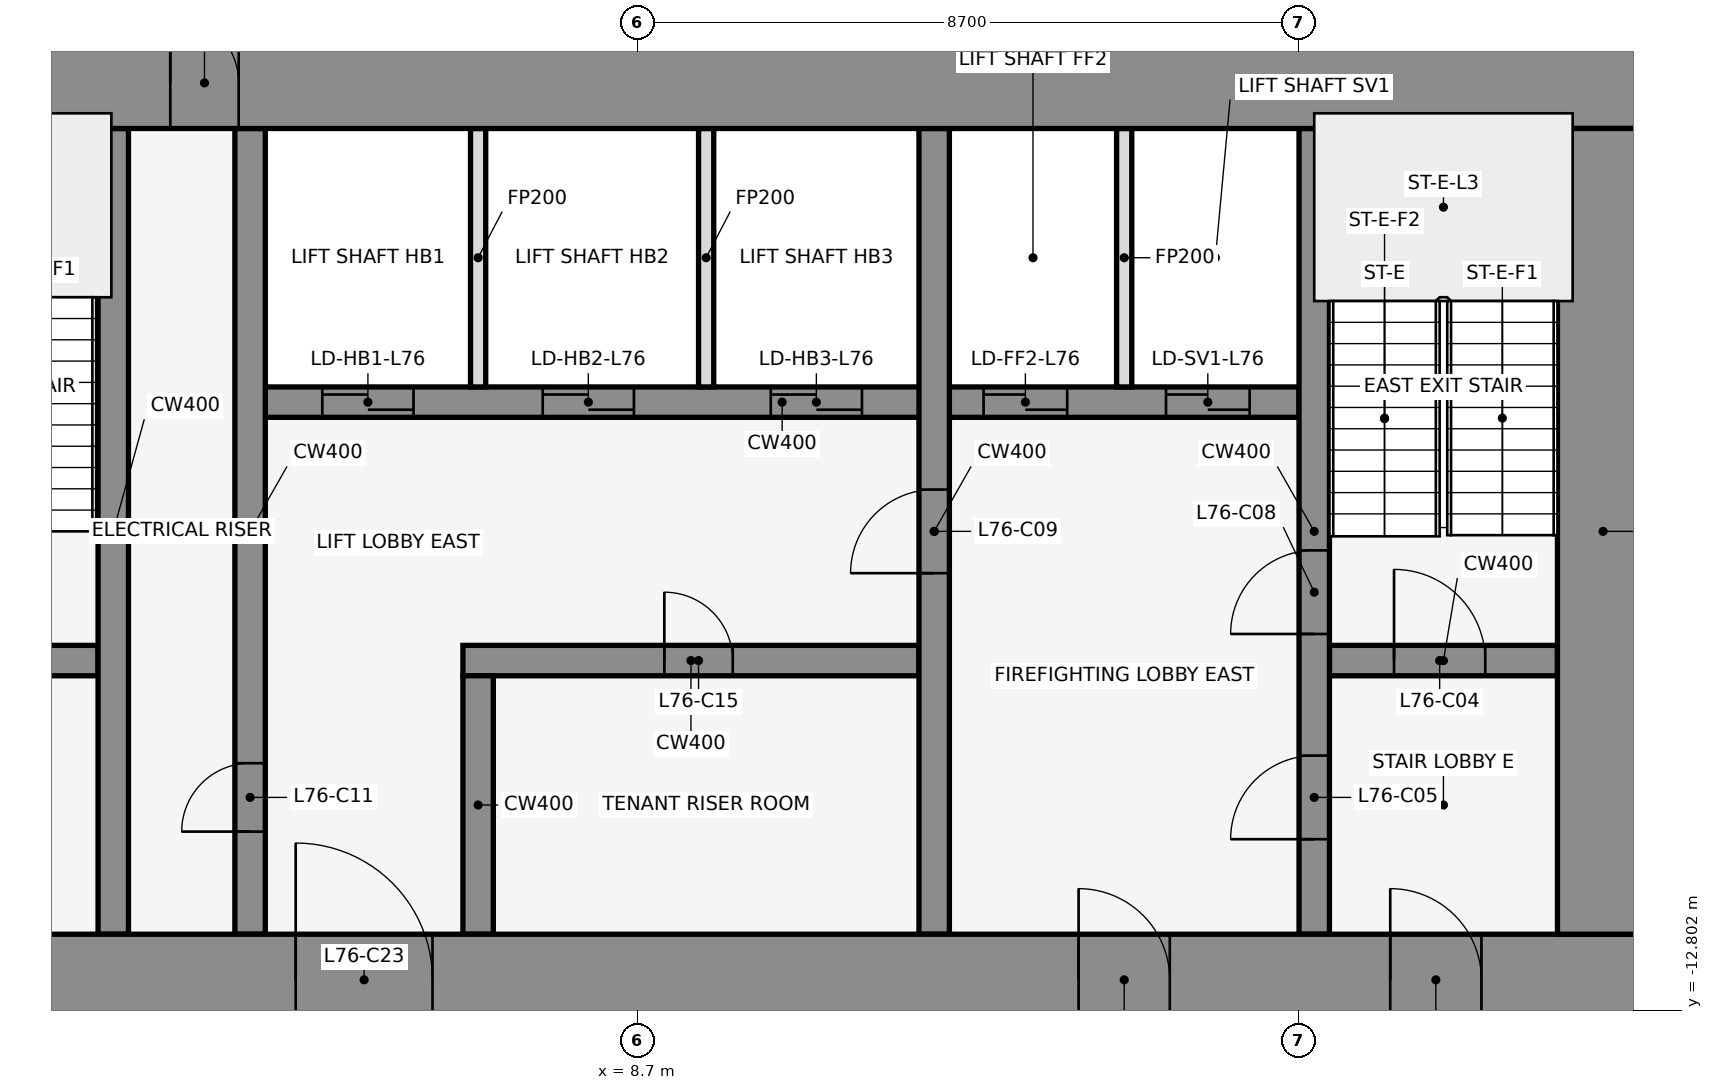
"""IFC4 building model, lengths in metres.
Left out: names, types, materials, properties, quantities, classifications, styles, units other than length and angle.
Written with IfcOpenShell. Run it as: python <this file> out.ifc"""

import sys

from ifc_helpers import new_model, si_unit, direction, frame, frame_2d, origin, place, context, subcontext, project, spatial, rectangle, extrude, element, fill, save


model = new_model("IFC4")
c1 = context("Model", 3, precision=1e-05, world=origin(), true_north=direction((0.0, 1.0)))
c2 = subcontext(c1, "Body", "Model", "MODEL_VIEW")
j1 = project(units=[si_unit("LENGTHUNIT", "METRE"), si_unit("PLANEANGLEUNIT", "RADIAN")], contexts=[c1])
p1 = place(None, origin())
s1 = spatial("IfcSite", under=j1, at=p1, CompositionType="ELEMENT")
p2 = place(p1, origin())
s2 = spatial("IfcBuilding", under=s1, at=p2, CompositionType="ELEMENT")
p3 = place(p2, frame((0.0, 0.0, 338.0)))
s3 = spatial("IfcBuildingStorey", under=s2, at=p3, CompositionType="ELEMENT", Elevation=338.0)
for number, where, z_axis, x_axis in (
    (1, (16.432, -0.105, 0.0), (0.0, 0.0, 1.0), (-0.84, 0.543, 0.0)),
    (2, (1.901, 1.08, 0.0), (0.0, 0.0, 1.0), (-0.84, -0.543, 0.0)),
):
    element("IfcWall", number, at=place(p3, frame(where, z_axis=z_axis, x_axis=x_axis)), inside=s3, PredefinedType="STANDARD", context=c2, shape_type="SweptSolid", body=[
        extrude(rectangle(XDim=2.183, YDim=0.25, at=frame_2d((1.091, 0.0))), origin(), (0.0, 0.0, 1.0), 4.3),
    ])
p4 = place(p3, frame((-1.6, -8.2, 0.0), z_axis=(0.0, 0.0, 1.0), x_axis=(1.0, 0.0, 0.0)))
e3 = element("IfcWall", 3, at=p4, inside=s3, PredefinedType="SHEAR", context=c2, shape_type="SweptSolid", body=[
    extrude(rectangle(XDim=3.2, YDim=0.4, at=frame_2d((1.6, 0.0))), origin(), (0.0, 0.0, 1.0), 4.5),
])
p5 = place(p4, frame((1.05, 0.0, 0.0)))
e4 = element("IfcOpeningElement", 4, at=p5, cuts=e3, PredefinedType="OPENING", context=c2, shape_type="SweptSolid", body=[
    extrude(rectangle(XDim=1.2, YDim=2.1, at=frame_2d((0.6, 1.05))), frame((0.0, 0.212, 0.0), z_axis=(0.0, -1.0, 0.0), x_axis=(1.0, 0.0, 0.0)), (0.0, 0.0, 1.0), 0.424),
])
p6 = place(p3, frame((6.4, -8.2, 0.0), z_axis=(0.0, 0.0, 1.0), x_axis=(1.0, 0.0, 0.0)))
e5 = element("IfcWall", 5, at=p6, inside=s3, PredefinedType="SHEAR", context=c2, shape_type="SweptSolid", body=[
    extrude(rectangle(XDim=6.0, YDim=0.4, at=frame_2d((3.0, 0.0))), origin(), (0.0, 0.0, 1.0), 4.5),
])
p7 = place(p6, frame((2.65, 0.0, 0.0)))
e6 = element("IfcOpeningElement", 6, at=p7, cuts=e5, PredefinedType="OPENING", context=c2, shape_type="SweptSolid", body=[
    extrude(rectangle(XDim=0.9, YDim=2.1, at=frame_2d((0.45, 1.05))), frame((0.0, 0.212, 0.0), z_axis=(0.0, -1.0, 0.0), x_axis=(1.0, 0.0, 0.0)), (0.0, 0.0, 1.0), 0.424),
])
p8 = place(p3, frame((17.8, -8.2, 0.0), z_axis=(0.0, 0.0, 1.0), x_axis=(1.0, 0.0, 0.0)))
e7 = element("IfcWall", 7, at=p8, inside=s3, PredefinedType="SHEAR", context=c2, shape_type="SweptSolid", body=[
    extrude(rectangle(XDim=3.0, YDim=0.4, at=frame_2d((1.5, 0.0))), origin(), (0.0, 0.0, 1.0), 4.5),
])
p9 = place(p8, frame((0.85, 0.0, 0.0)))
e8 = element("IfcOpeningElement", 8, at=p9, cuts=e7, PredefinedType="OPENING", context=c2, shape_type="SweptSolid", body=[
    extrude(rectangle(XDim=1.2, YDim=2.1, at=frame_2d((0.6, 1.05))), frame((0.0, 0.212, 0.0), z_axis=(0.0, -1.0, 0.0), x_axis=(1.0, 0.0, 0.0)), (0.0, 0.0, 1.0), 0.424),
])
p10 = place(p3, frame((3.8, -4.8, 0.0), z_axis=(0.0, 0.0, 1.0), x_axis=(1.0, 0.0, 0.0)))
e9 = element("IfcWall", 9, at=p10, inside=s3, PredefinedType="SHEAR", context=c2, shape_type="SweptSolid", body=[
    extrude(rectangle(XDim=13.6, YDim=0.4, at=frame_2d((6.8, 0.0))), origin(), (0.0, 0.0, 1.0), 4.5),
])
p11 = place(p10, frame((0.75, 0.0, 0.0)))
e10 = element("IfcOpeningElement", 10, at=p11, cuts=e9, PredefinedType="OPENING", context=c2, shape_type="SweptSolid", body=[
    extrude(rectangle(XDim=1.2, YDim=2.1, at=frame_2d((0.6, 1.05))), frame((0.0, 0.212, 0.0), z_axis=(0.0, -1.0, 0.0), x_axis=(1.0, 0.0, 0.0)), (0.0, 0.0, 1.0), 0.424),
])
p12 = place(p10, frame((3.65, 0.0, 0.0)))
e11 = element("IfcOpeningElement", 11, at=p12, cuts=e9, PredefinedType="OPENING", context=c2, shape_type="SweptSolid", body=[
    extrude(rectangle(XDim=1.2, YDim=2.1, at=frame_2d((0.6, 1.05))), frame((0.0, 0.212, 0.0), z_axis=(0.0, -1.0, 0.0), x_axis=(1.0, 0.0, 0.0)), (0.0, 0.0, 1.0), 0.424),
])
p13 = place(p10, frame((6.65, 0.0, 0.0)))
e12 = element("IfcOpeningElement", 12, at=p13, cuts=e9, PredefinedType="OPENING", context=c2, shape_type="SweptSolid", body=[
    extrude(rectangle(XDim=1.2, YDim=2.1, at=frame_2d((0.6, 1.05))), frame((0.0, 0.212, 0.0), z_axis=(0.0, -1.0, 0.0), x_axis=(1.0, 0.0, 0.0)), (0.0, 0.0, 1.0), 0.424),
])
p14 = place(p10, frame((9.45, 0.0, 0.0)))
e13 = element("IfcOpeningElement", 13, at=p14, cuts=e9, PredefinedType="OPENING", context=c2, shape_type="SweptSolid", body=[
    extrude(rectangle(XDim=1.1, YDim=2.1, at=frame_2d((0.55, 1.05))), frame((0.0, 0.212, 0.0), z_axis=(0.0, -1.0, 0.0), x_axis=(1.0, 0.0, 0.0)), (0.0, 0.0, 1.0), 0.424),
])
p15 = place(p10, frame((11.85, 0.0, 0.0)))
e14 = element("IfcOpeningElement", 14, at=p15, cuts=e9, PredefinedType="OPENING", context=c2, shape_type="SweptSolid", body=[
    extrude(rectangle(XDim=1.1, YDim=2.1, at=frame_2d((0.55, 1.05))), frame((0.0, 0.212, 0.0), z_axis=(0.0, -1.0, 0.0), x_axis=(1.0, 0.0, 0.0)), (0.0, 0.0, 1.0), 0.424),
])
p16 = place(p3, frame((1.8, -11.8, 0.0), z_axis=(0.0, 0.0, 1.0), x_axis=(0.0, 1.0, 0.0)))
e15 = element("IfcWall", 15, at=p16, inside=s3, PredefinedType="SHEAR", context=c2, shape_type="SweptSolid", body=[
    extrude(rectangle(XDim=10.6, YDim=0.4, at=frame_2d((5.3, 0.0))), origin(), (0.0, 0.0, 1.0), 4.5),
])
p17 = place(p3, frame((3.6, -11.8, 0.0), z_axis=(0.0, 0.0, 1.0), x_axis=(0.0, 1.0, 0.0)))
e16 = element("IfcWall", 16, at=p17, inside=s3, PredefinedType="SHEAR", context=c2, shape_type="SweptSolid", body=[
    extrude(rectangle(XDim=10.6, YDim=0.4, at=frame_2d((5.3, 0.0))), origin(), (0.0, 0.0, 1.0), 4.5),
])
p18 = place(p17, frame((1.35, 0.0, 0.0)))
e17 = element("IfcOpeningElement", 17, at=p18, cuts=e16, PredefinedType="OPENING", context=c2, shape_type="SweptSolid", body=[
    extrude(rectangle(XDim=0.9, YDim=2.1, at=frame_2d((0.45, 1.05))), frame((0.0, 0.212, 0.0), z_axis=(0.0, -1.0, 0.0), x_axis=(1.0, 0.0, 0.0)), (0.0, 0.0, 1.0), 0.424),
])
p19 = place(p3, frame((6.6, -11.8, 0.0), z_axis=(0.0, 0.0, 1.0), x_axis=(0.0, 1.0, 0.0)))
e18 = element("IfcWall", 18, at=p19, inside=s3, PredefinedType="SHEAR", context=c2, shape_type="SweptSolid", body=[
    extrude(rectangle(XDim=3.4, YDim=0.4, at=frame_2d((1.7, 0.0))), origin(), (0.0, 0.0, 1.0), 4.5),
])
for number, where, z_axis, x_axis in (
    (19, (6.6, -4.6, 0.0), (0.0, 0.0, 1.0), (0.0, 1.0, 0.0)),
    (20, (9.6, -4.6, 0.0), (0.0, 0.0, 1.0), (0.0, 1.0, 0.0)),
):
    element("IfcWall", number, at=place(p3, frame(where, z_axis=z_axis, x_axis=x_axis)), inside=s3, PredefinedType="PARTITIONING", context=c2, shape_type="SweptSolid", body=[
        extrude(rectangle(XDim=3.4, YDim=0.2, at=frame_2d((1.7, 0.0))), origin(), (0.0, 0.0, 1.0), 3.368),
    ])
p20 = place(p3, frame((12.6, -11.8, 0.0), z_axis=(0.0, 0.0, 1.0), x_axis=(0.0, 1.0, 0.0)))
e21 = element("IfcWall", 21, at=p20, inside=s3, PredefinedType="SHEAR", context=c2, shape_type="SweptSolid", body=[
    extrude(rectangle(XDim=10.6, YDim=0.4, at=frame_2d((5.3, 0.0))), origin(), (0.0, 0.0, 1.0), 4.5),
])
p21 = place(p20, frame((4.75, 0.0, 0.0)))
e22 = element("IfcOpeningElement", 22, at=p21, cuts=e21, PredefinedType="OPENING", context=c2, shape_type="SweptSolid", body=[
    extrude(rectangle(XDim=1.1, YDim=2.1, at=frame_2d((0.55, 1.05))), frame((0.0, 0.212, 0.0), z_axis=(0.0, -1.0, 0.0), x_axis=(1.0, 0.0, 0.0)), (0.0, 0.0, 1.0), 0.424),
])
p22 = place(p3, frame((15.1, -4.6, 0.0), z_axis=(0.0, 0.0, 1.0), x_axis=(0.0, 1.0, 0.0)))
e23 = element("IfcWall", 23, at=p22, inside=s3, PredefinedType="PARTITIONING", context=c2, shape_type="SweptSolid", body=[
    extrude(rectangle(XDim=3.4, YDim=0.2, at=frame_2d((1.7, 0.0))), origin(), (0.0, 0.0, 1.0), 3.368),
])
p23 = place(p3, frame((17.6, -11.8, 0.0), z_axis=(0.0, 0.0, 1.0), x_axis=(0.0, 1.0, 0.0)))
e24 = element("IfcWall", 24, at=p23, inside=s3, PredefinedType="SHEAR", context=c2, shape_type="SweptSolid", body=[
    extrude(rectangle(XDim=10.6, YDim=0.4, at=frame_2d((5.3, 0.0))), origin(), (0.0, 0.0, 1.0), 4.5),
])
p24 = place(p23, frame((1.25, 0.0, 0.0)))
e25 = element("IfcOpeningElement", 25, at=p24, cuts=e24, PredefinedType="OPENING", context=c2, shape_type="SweptSolid", body=[
    extrude(rectangle(XDim=1.1, YDim=2.1, at=frame_2d((0.55, 1.05))), frame((0.0, 0.212, 0.0), z_axis=(0.0, -1.0, 0.0), x_axis=(1.0, 0.0, 0.0)), (0.0, 0.0, 1.0), 0.424),
])
p25 = place(p23, frame((3.95, 0.0, 0.0)))
e26 = element("IfcOpeningElement", 26, at=p25, cuts=e24, PredefinedType="OPENING", context=c2, shape_type="SweptSolid", body=[
    extrude(rectangle(XDim=1.1, YDim=2.1, at=frame_2d((0.55, 1.05))), frame((0.0, 0.212, 0.0), z_axis=(0.0, -1.0, 0.0), x_axis=(1.0, 0.0, 0.0)), (0.0, 0.0, 1.0), 0.424),
])
p26 = place(p3, frame((-22.0, -0.6, 0.0), z_axis=(0.0, 0.0, 1.0), x_axis=(1.0, 0.0, 0.0)))
e27 = element("IfcWall", 27, at=p26, inside=s3, PredefinedType="SHEAR", context=c2, shape_type="SweptSolid", body=[
    extrude(rectangle(XDim=44.0, YDim=1.2, at=frame_2d((22.0, 0.0))), origin(), (0.0, 0.0, 1.0), 4.5),
])
p27 = place(p26, frame((18.55, 0.0, 0.0)))
e28 = element("IfcOpeningElement", 28, at=p27, cuts=e27, PredefinedType="OPENING", context=c2, shape_type="SweptSolid", body=[
    extrude(rectangle(XDim=0.9, YDim=2.1, at=frame_2d((0.45, 1.05))), frame((0.0, 0.612, 0.0), z_axis=(0.0, -1.0, 0.0), x_axis=(1.0, 0.0, 0.0)), (0.0, 0.0, 1.0), 1.224),
])
p28 = place(p26, frame((24.55, 0.0, 0.0)))
e29 = element("IfcOpeningElement", 29, at=p28, cuts=e27, PredefinedType="OPENING", context=c2, shape_type="SweptSolid", body=[
    extrude(rectangle(XDim=0.9, YDim=2.1, at=frame_2d((0.45, 1.05))), frame((0.0, 0.612, 0.0), z_axis=(0.0, -1.0, 0.0), x_axis=(1.0, 0.0, 0.0)), (0.0, 0.0, 1.0), 1.224),
])
p29 = place(p3, frame((-22.0, -12.4, 0.0), z_axis=(0.0, 0.0, 1.0), x_axis=(1.0, 0.0, 0.0)))
e30 = element("IfcWall", 30, at=p29, inside=s3, PredefinedType="SHEAR", context=c2, shape_type="SweptSolid", body=[
    extrude(rectangle(XDim=44.0, YDim=1.2, at=frame_2d((22.0, 0.0))), origin(), (0.0, 0.0, 1.0), 4.5),
])
p30 = place(p29, frame((2.2, 0.0, 0.0)))
e31 = element("IfcOpeningElement", 31, at=p30, cuts=e30, PredefinedType="OPENING", context=c2, shape_type="SweptSolid", body=[
    extrude(rectangle(XDim=1.2, YDim=2.1, at=frame_2d((0.6, 1.05))), frame((0.0, 0.612, 0.0), z_axis=(0.0, -1.0, 0.0), x_axis=(1.0, 0.0, 0.0)), (0.0, 0.0, 1.0), 1.224),
])
p31 = place(p29, frame((21.4, 0.0, 0.0)))
e32 = element("IfcOpeningElement", 32, at=p31, cuts=e30, PredefinedType="OPENING", context=c2, shape_type="SweptSolid", body=[
    extrude(rectangle(XDim=1.2, YDim=2.1, at=frame_2d((0.6, 1.05))), frame((0.0, 0.612, 0.0), z_axis=(0.0, -1.0, 0.0), x_axis=(1.0, 0.0, 0.0)), (0.0, 0.0, 1.0), 1.224),
])
p32 = place(p29, frame((40.6, 0.0, 0.0)))
e33 = element("IfcOpeningElement", 33, at=p32, cuts=e30, PredefinedType="OPENING", context=c2, shape_type="SweptSolid", body=[
    extrude(rectangle(XDim=1.2, YDim=2.1, at=frame_2d((0.6, 1.05))), frame((0.0, 0.612, 0.0), z_axis=(0.0, -1.0, 0.0), x_axis=(1.0, 0.0, 0.0)), (0.0, 0.0, 1.0), 1.224),
])
p33 = place(p29, frame((16.0, 0.0, 0.0)))
e34 = element("IfcOpeningElement", 34, at=p33, cuts=e30, PredefinedType="OPENING", context=c2, shape_type="SweptSolid", body=[
    extrude(rectangle(XDim=1.8, YDim=2.1, at=frame_2d((0.9, 1.05))), frame((0.0, 0.612, 0.0), z_axis=(0.0, -1.0, 0.0), x_axis=(1.0, 0.0, 0.0)), (0.0, 0.0, 1.0), 1.224),
])
p34 = place(p29, frame((6.3, 0.0, 0.0)))
e35 = element("IfcOpeningElement", 35, at=p34, cuts=e30, PredefinedType="OPENING", context=c2, shape_type="SweptSolid", body=[
    extrude(rectangle(XDim=1.2, YDim=2.1, at=frame_2d((0.6, 1.05))), frame((0.0, 0.612, 0.0), z_axis=(0.0, -1.0, 0.0), x_axis=(1.0, 0.0, 0.0)), (0.0, 0.0, 1.0), 1.224),
])
p35 = place(p29, frame((26.2, 0.0, 0.0)))
e36 = element("IfcOpeningElement", 36, at=p35, cuts=e30, PredefinedType="OPENING", context=c2, shape_type="SweptSolid", body=[
    extrude(rectangle(XDim=1.8, YDim=2.1, at=frame_2d((0.9, 1.05))), frame((0.0, 0.612, 0.0), z_axis=(0.0, -1.0, 0.0), x_axis=(1.0, 0.0, 0.0)), (0.0, 0.0, 1.0), 1.224),
])
p36 = place(p29, frame((36.5, 0.0, 0.0)))
e37 = element("IfcOpeningElement", 37, at=p36, cuts=e30, PredefinedType="OPENING", context=c2, shape_type="SweptSolid", body=[
    extrude(rectangle(XDim=1.2, YDim=2.1, at=frame_2d((0.6, 1.05))), frame((0.0, 0.612, 0.0), z_axis=(0.0, -1.0, 0.0), x_axis=(1.0, 0.0, 0.0)), (0.0, 0.0, 1.0), 1.224),
])
p37 = place(p3, frame((21.4, -11.8, 0.0), z_axis=(0.0, 0.0, 1.0), x_axis=(0.0, 1.0, 0.0)))
e38 = element("IfcWall", 38, at=p37, inside=s3, PredefinedType="SHEAR", context=c2, shape_type="SweptSolid", body=[
    extrude(rectangle(XDim=10.6, YDim=1.2, at=frame_2d((5.3, 0.0))), origin(), (0.0, 0.0, 1.0), 4.5),
])
p38 = place(p9, origin())
e39 = element("IfcDoor", 39, at=p38, inside=s3, OperationType="SINGLE_SWING_RIGHT", PredefinedType="DOOR", context=c2, shape_type="SweptSolid", body=[
    extrude(rectangle(XDim=1.2, YDim=2.1, at=frame_2d((0.6, 1.05))), frame((0.0, 0.025, 0.0), z_axis=(0.0, -1.0, 0.0), x_axis=(1.0, 0.0, 0.0)), (0.0, 0.0, 1.0), 0.05),
])
fill(e8, e39)
p39 = place(p24, origin())
e40 = element("IfcDoor", 40, at=p39, inside=s3, OperationType="SINGLE_SWING_LEFT", PredefinedType="DOOR", context=c2, shape_type="SweptSolid", body=[
    extrude(rectangle(XDim=1.1, YDim=2.1, at=frame_2d((0.55, 1.05))), frame((0.0, 0.025, 0.0), z_axis=(0.0, -1.0, 0.0), x_axis=(1.0, 0.0, 0.0)), (0.0, 0.0, 1.0), 0.05),
])
fill(e25, e40)
p40 = place(p11, origin())
e41 = element("IfcDoor", 41, at=p40, inside=s3, OperationType="DOUBLE_DOOR_SLIDING", PredefinedType="DOOR", context=c2, shape_type="SweptSolid", body=[
    extrude(rectangle(XDim=1.2, YDim=2.1, at=frame_2d((0.6, 1.05))), frame((0.0, 0.025, 0.0), z_axis=(0.0, -1.0, 0.0), x_axis=(1.0, 0.0, 0.0)), (0.0, 0.0, 1.0), 0.05),
])
fill(e10, e41)
p41 = place(p12, origin())
e42 = element("IfcDoor", 42, at=p41, inside=s3, OperationType="DOUBLE_DOOR_SLIDING", PredefinedType="DOOR", context=c2, shape_type="SweptSolid", body=[
    extrude(rectangle(XDim=1.2, YDim=2.1, at=frame_2d((0.6, 1.05))), frame((0.0, 0.025, 0.0), z_axis=(0.0, -1.0, 0.0), x_axis=(1.0, 0.0, 0.0)), (0.0, 0.0, 1.0), 0.05),
])
fill(e11, e42)
p42 = place(p13, origin())
e43 = element("IfcDoor", 43, at=p42, inside=s3, OperationType="DOUBLE_DOOR_SLIDING", PredefinedType="DOOR", context=c2, shape_type="SweptSolid", body=[
    extrude(rectangle(XDim=1.2, YDim=2.1, at=frame_2d((0.6, 1.05))), frame((0.0, 0.025, 0.0), z_axis=(0.0, -1.0, 0.0), x_axis=(1.0, 0.0, 0.0)), (0.0, 0.0, 1.0), 0.05),
])
fill(e12, e43)
p43 = place(p14, origin())
e44 = element("IfcDoor", 44, at=p43, inside=s3, OperationType="DOUBLE_DOOR_SLIDING", PredefinedType="DOOR", context=c2, shape_type="SweptSolid", body=[
    extrude(rectangle(XDim=1.1, YDim=2.1, at=frame_2d((0.55, 1.05))), frame((0.0, 0.025, 0.0), z_axis=(0.0, -1.0, 0.0), x_axis=(1.0, 0.0, 0.0)), (0.0, 0.0, 1.0), 0.05),
])
fill(e13, e44)
p44 = place(p15, origin())
e45 = element("IfcDoor", 45, at=p44, inside=s3, OperationType="DOUBLE_DOOR_SLIDING", PredefinedType="DOOR", context=c2, shape_type="SweptSolid", body=[
    extrude(rectangle(XDim=1.1, YDim=2.1, at=frame_2d((0.55, 1.05))), frame((0.0, 0.025, 0.0), z_axis=(0.0, -1.0, 0.0), x_axis=(1.0, 0.0, 0.0)), (0.0, 0.0, 1.0), 0.05),
])
fill(e14, e45)
p45 = place(p25, origin())
e46 = element("IfcDoor", 46, at=p45, inside=s3, OperationType="SINGLE_SWING_RIGHT", PredefinedType="DOOR", context=c2, shape_type="SweptSolid", body=[
    extrude(rectangle(XDim=1.1, YDim=2.1, at=frame_2d((0.55, 1.05))), frame((0.0, 0.025, 0.0), z_axis=(0.0, -1.0, 0.0), x_axis=(1.0, 0.0, 0.0)), (0.0, 0.0, 1.0), 0.05),
])
fill(e26, e46)
p46 = place(p21, frame((1.1, 0.0, 0.0), z_axis=(0.0, 0.0, 1.0), x_axis=(-1.0, 0.0, 0.0)))
e47 = element("IfcDoor", 47, at=p46, inside=s3, OperationType="SINGLE_SWING_RIGHT", PredefinedType="DOOR", context=c2, shape_type="SweptSolid", body=[
    extrude(rectangle(XDim=1.1, YDim=2.1, at=frame_2d((0.55, 1.05))), frame((0.0, 0.025, 0.0), z_axis=(0.0, -1.0, 0.0), x_axis=(1.0, 0.0, 0.0)), (0.0, 0.0, 1.0), 0.05),
])
fill(e22, e47)
p47 = place(p18, origin())
e48 = element("IfcDoor", 48, at=p47, inside=s3, OperationType="SINGLE_SWING_LEFT", PredefinedType="DOOR", context=c2, shape_type="SweptSolid", body=[
    extrude(rectangle(XDim=0.9, YDim=2.1, at=frame_2d((0.45, 1.05))), frame((0.0, 0.025, 0.0), z_axis=(0.0, -1.0, 0.0), x_axis=(1.0, 0.0, 0.0)), (0.0, 0.0, 1.0), 0.05),
])
fill(e17, e48)
p48 = place(p7, frame((0.9, 0.0, 0.0), z_axis=(0.0, 0.0, 1.0), x_axis=(-1.0, 0.0, 0.0)))
e49 = element("IfcDoor", 49, at=p48, inside=s3, OperationType="SINGLE_SWING_RIGHT", PredefinedType="DOOR", context=c2, shape_type="SweptSolid", body=[
    extrude(rectangle(XDim=0.9, YDim=2.1, at=frame_2d((0.45, 1.05))), frame((0.0, 0.025, 0.0), z_axis=(0.0, -1.0, 0.0), x_axis=(1.0, 0.0, 0.0)), (0.0, 0.0, 1.0), 0.05),
])
fill(e6, e49)
p49 = place(p28, origin())
e50 = element("IfcDoor", 50, at=p49, inside=s3, OperationType="SINGLE_SWING_LEFT", PredefinedType="DOOR", context=c2, shape_type="SweptSolid", body=[
    extrude(rectangle(XDim=0.9, YDim=2.1, at=frame_2d((0.45, 1.05))), frame((0.0, 0.025, 0.0), z_axis=(0.0, -1.0, 0.0), x_axis=(1.0, 0.0, 0.0)), (0.0, 0.0, 1.0), 0.05),
])
fill(e29, e50)
p50 = place(p32, frame((1.2, 0.0, 0.0), z_axis=(0.0, 0.0, 1.0), x_axis=(-1.0, 0.0, 0.0)))
e51 = element("IfcDoor", 51, at=p50, inside=s3, OperationType="SINGLE_SWING_RIGHT", PredefinedType="DOOR", context=c2, shape_type="SweptSolid", body=[
    extrude(rectangle(XDim=1.2, YDim=2.1, at=frame_2d((0.6, 1.05))), frame((0.0, 0.025, 0.0), z_axis=(0.0, -1.0, 0.0), x_axis=(1.0, 0.0, 0.0)), (0.0, 0.0, 1.0), 0.05),
])
fill(e33, e51)
p51 = place(p35, origin())
e52 = element("IfcDoor", 52, at=p51, inside=s3, OperationType="SINGLE_SWING_LEFT", PredefinedType="DOOR", context=c2, shape_type="SweptSolid", body=[
    extrude(rectangle(XDim=1.8, YDim=2.1, at=frame_2d((0.9, 1.05))), frame((0.0, 0.025, 0.0), z_axis=(0.0, -1.0, 0.0), x_axis=(1.0, 0.0, 0.0)), (0.0, 0.0, 1.0), 0.05),
])
fill(e36, e52)
p52 = place(p36, frame((1.2, 0.0, 0.0), z_axis=(0.0, 0.0, 1.0), x_axis=(-1.0, 0.0, 0.0)))
e53 = element("IfcDoor", 53, at=p52, inside=s3, OperationType="SINGLE_SWING_RIGHT", PredefinedType="DOOR", context=c2, shape_type="SweptSolid", body=[
    extrude(rectangle(XDim=1.2, YDim=2.1, at=frame_2d((0.6, 1.05))), frame((0.0, 0.025, 0.0), z_axis=(0.0, -1.0, 0.0), x_axis=(1.0, 0.0, 0.0)), (0.0, 0.0, 1.0), 0.05),
])
fill(e37, e53)
save(model, sys.argv[1])
